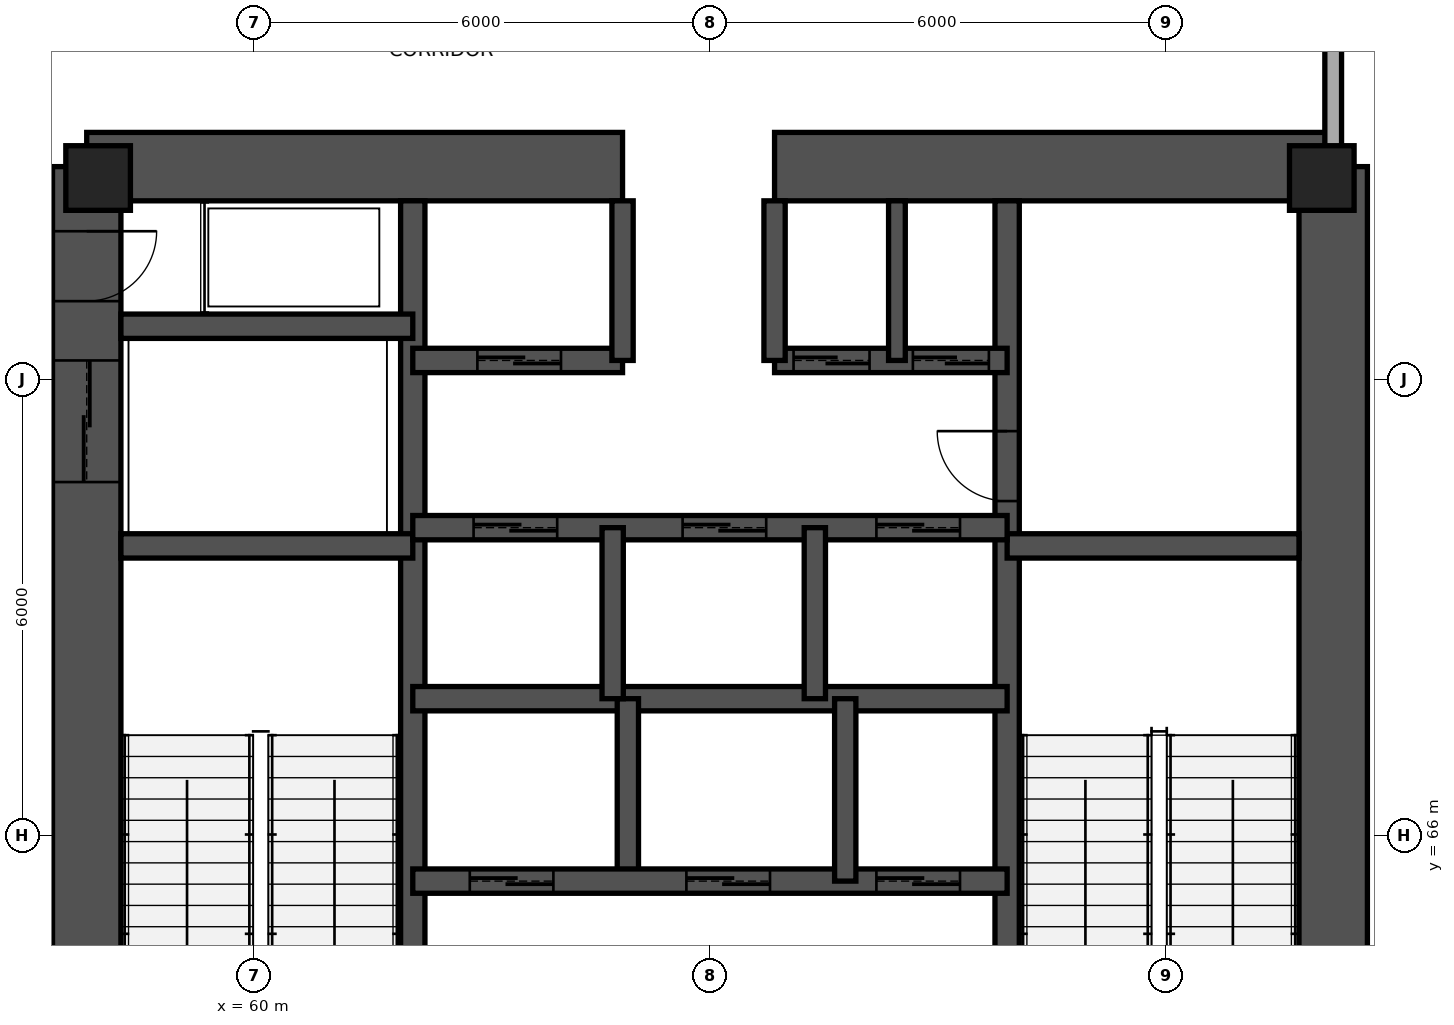
"""IFC4 building model, lengths in metres.
Left out: names, types, materials, properties, quantities, classifications, styles, units other than length and angle.
Written with IfcOpenShell. Run it as: python <this file> out.ifc"""

import sys

from ifc_helpers import new_model, si_unit, direction, frame, frame_2d, origin, origin_2d, place, context, subcontext, project, spatial, rectangle, extrude, element, fill, save


model = new_model("IFC4")
c1 = context("Model", 3, precision=1e-05, world=origin(), true_north=direction((0.0, 1.0)))
c2 = subcontext(c1, "Body", "Model", "MODEL_VIEW")
j1 = project(units=[si_unit("LENGTHUNIT", "METRE"), si_unit("PLANEANGLEUNIT", "RADIAN")], contexts=[c1])
p1 = place(None, origin())
s1 = spatial("IfcSite", under=j1, at=p1, CompositionType="ELEMENT")
p2 = place(p1, origin())
s2 = spatial("IfcBuilding", under=s1, at=p2, CompositionType="ELEMENT")
p3 = place(p2, origin())
s3 = spatial("IfcBuildingStorey", under=s2, at=p3, CompositionType="ELEMENT", Elevation=0.0)
p4 = place(p3, frame((74.2, 61.2, 0.0), z_axis=(0.0, 0.0, 1.0), x_axis=(0.0, 1.0, 0.0)))
e1 = element("IfcWall", 1, at=p4, inside=s3, PredefinedType="SHEAR", context=c2, shape_type="SweptSolid", body=[
    extrude(rectangle(XDim=13.6, YDim=0.9, at=frame_2d((6.8, 0.0))), origin(), (0.0, 0.0, 1.0), 5.4),
])
p5 = place(p3, frame((74.2, 74.8, 0.0), z_axis=(0.0, 0.0, 1.0), x_axis=(-1.0, 0.0, 0.0)))
e2 = element("IfcWall", 2, at=p5, inside=s3, PredefinedType="SHEAR", context=c2, shape_type="SweptSolid", body=[
    extrude(rectangle(XDim=7.35, YDim=0.9, at=frame_2d((3.675, 0.0))), origin(), (0.0, 0.0, 1.0), 5.4),
])
p6 = place(p3, frame((64.85, 74.8, 0.0), z_axis=(0.0, 0.0, 1.0), x_axis=(-1.0, 0.0, 0.0)))
e3 = element("IfcWall", 3, at=p6, inside=s3, PredefinedType="SHEAR", context=c2, shape_type="SweptSolid", body=[
    extrude(rectangle(XDim=7.05, YDim=0.9, at=frame_2d((3.525, 0.0))), origin(), (0.0, 0.0, 1.0), 5.4),
])
p7 = place(p3, frame((57.8, 74.8, 0.0), z_axis=(0.0, 0.0, 1.0), x_axis=(0.0, -1.0, 0.0)))
e4 = element("IfcWall", 4, at=p7, inside=s3, PredefinedType="SHEAR", context=c2, shape_type="SweptSolid", body=[
    extrude(rectangle(XDim=13.6, YDim=0.9, at=frame_2d((6.8, 0.0))), origin(), (0.0, 0.0, 1.0), 5.4),
])
p8 = place(p7, frame((0.85, 0.0, 0.0)))
e5 = element("IfcOpeningElement", 5, at=p8, cuts=e4, PredefinedType="OPENING", context=c2, shape_type="SweptSolid", body=[
    extrude(rectangle(XDim=0.92, YDim=2.05, at=frame_2d((0.46, 1.025))), frame((0.0, 0.46, 0.0), z_axis=(0.0, -1.0, 0.0), x_axis=(1.0, 0.0, 0.0)), (0.0, 0.0, 1.0), 0.92),
])
p9 = place(p7, frame((2.55, 0.0, 0.0)))
e6 = element("IfcOpeningElement", 6, at=p9, cuts=e4, PredefinedType="OPENING", context=c2, shape_type="SweptSolid", body=[
    extrude(rectangle(XDim=1.6, YDim=2.3, at=frame_2d((0.8, 1.15))), frame((0.0, 0.46, 0.0), z_axis=(0.0, -1.0, 0.0), x_axis=(1.0, 0.0, 0.0)), (0.0, 0.0, 1.0), 0.92),
])
p10 = place(p3, frame((62.09, 61.65, 0.0), z_axis=(0.0, 0.0, 1.0), x_axis=(0.0, 1.0, 0.0)))
e7 = element("IfcWall", 7, at=p10, inside=s3, PredefinedType="SHEAR", context=c2, shape_type="SweptSolid", body=[
    extrude(rectangle(XDim=12.7, YDim=0.32, at=frame_2d((6.35, 0.0))), origin(), (0.0, 0.0, 1.0), 5.4),
])
p11 = place(p10, frame((0.55, 0.0, 0.0)))
e8 = element("IfcOpeningElement", 8, at=p11, cuts=e7, PredefinedType="OPENING", context=c2, shape_type="SweptSolid", body=[
    extrude(rectangle(XDim=1.15, YDim=2.15, at=frame_2d((0.575, 1.075))), frame((0.0, 0.17, 0.0), z_axis=(0.0, -1.0, 0.0), x_axis=(1.0, 0.0, 0.0)), (0.0, 0.0, 1.0), 0.34),
])
p12 = place(p3, frame((69.91, 61.65, 0.0), z_axis=(0.0, 0.0, 1.0), x_axis=(0.0, 1.0, 0.0)))
e9 = element("IfcWall", 9, at=p12, inside=s3, PredefinedType="SHEAR", context=c2, shape_type="SweptSolid", body=[
    extrude(rectangle(XDim=12.7, YDim=0.32, at=frame_2d((6.35, 0.0))), origin(), (0.0, 0.0, 1.0), 5.4),
])
p13 = place(p12, frame((8.75, 0.0, 0.0)))
e10 = element("IfcOpeningElement", 10, at=p13, cuts=e9, PredefinedType="OPENING", context=c2, shape_type="SweptSolid", body=[
    extrude(rectangle(XDim=0.92, YDim=2.05, at=frame_2d((0.46, 1.025))), frame((0.0, 0.17, 0.0), z_axis=(0.0, -1.0, 0.0), x_axis=(1.0, 0.0, 0.0)), (0.0, 0.0, 1.0), 0.34),
])
for number, where, z_axis, x_axis in (
    (11, (58.25, 69.81, 0.0), (0.0, 0.0, 1.0), (1.0, 0.0, 0.0)),
    (12, (69.91, 69.81, 0.0), (0.0, 0.0, 1.0), (1.0, 0.0, 0.0)),
    (13, (58.25, 72.7, 0.0), (0.0, 0.0, 1.0), (1.0, 0.0, 0.0)),
):
    element("IfcWall", number, at=place(p3, frame(where, z_axis=z_axis, x_axis=x_axis)), inside=s3, PredefinedType="SHEAR", context=c2, shape_type="SweptSolid", body=[
        extrude(rectangle(XDim=3.84, YDim=0.32, at=frame_2d((1.92, 0.0))), origin(), (0.0, 0.0, 1.0), 5.4),
    ])
p14 = place(p3, frame((62.09, 67.8, 0.0), z_axis=(0.0, 0.0, 1.0), x_axis=(1.0, 0.0, 0.0)))
e14 = element("IfcWall", 14, at=p14, inside=s3, PredefinedType="SHEAR", context=c2, shape_type="SweptSolid", body=[
    extrude(rectangle(XDim=7.82, YDim=0.32, at=frame_2d((3.91, 0.0))), origin(), (0.0, 0.0, 1.0), 5.4),
])
p15 = place(p3, frame((64.92, 65.4, 0.0), z_axis=(0.0, 0.0, 1.0), x_axis=(0.0, 1.0, 0.0)))
e15 = element("IfcWall", 15, at=p15, inside=s3, PredefinedType="SHEAR", context=c2, shape_type="SweptSolid", body=[
    extrude(rectangle(XDim=2.4, YDim=0.28, at=frame_2d((1.2, 0.0))), origin(), (0.0, 0.0, 1.0), 5.4),
])
p16 = place(p3, frame((62.09, 70.05, 0.0), z_axis=(0.0, 0.0, 1.0), x_axis=(1.0, 0.0, 0.0)))
e16 = element("IfcWall", 16, at=p16, inside=s3, PredefinedType="SHEAR", context=c2, shape_type="SweptSolid", body=[
    extrude(rectangle(XDim=7.82, YDim=0.32, at=frame_2d((3.91, 0.0))), origin(), (0.0, 0.0, 1.0), 5.4),
])
p17 = place(p16, frame((0.8, 0.0, 0.0)))
e17 = element("IfcOpeningElement", 17, at=p17, cuts=e16, PredefinedType="OPENING", context=c2, shape_type="SweptSolid", body=[
    extrude(rectangle(XDim=1.1, YDim=2.2, at=frame_2d((0.55, 1.1))), frame((0.0, 0.17, 0.0), z_axis=(0.0, -1.0, 0.0), x_axis=(1.0, 0.0, 0.0)), (0.0, 0.0, 1.0), 0.34),
])
p18 = place(p16, frame((3.55, 0.0, 0.0)))
e18 = element("IfcOpeningElement", 18, at=p18, cuts=e16, PredefinedType="OPENING", context=c2, shape_type="SweptSolid", body=[
    extrude(rectangle(XDim=1.1, YDim=2.2, at=frame_2d((0.55, 1.1))), frame((0.0, 0.17, 0.0), z_axis=(0.0, -1.0, 0.0), x_axis=(1.0, 0.0, 0.0)), (0.0, 0.0, 1.0), 0.34),
])
p19 = place(p16, frame((6.1, 0.0, 0.0)))
e19 = element("IfcOpeningElement", 19, at=p19, cuts=e16, PredefinedType="OPENING", context=c2, shape_type="SweptSolid", body=[
    extrude(rectangle(XDim=1.1, YDim=2.2, at=frame_2d((0.55, 1.1))), frame((0.0, 0.17, 0.0), z_axis=(0.0, -1.0, 0.0), x_axis=(1.0, 0.0, 0.0)), (0.0, 0.0, 1.0), 0.34),
])
p20 = place(p3, frame((62.09, 72.25, 0.0), z_axis=(0.0, 0.0, 1.0), x_axis=(1.0, 0.0, 0.0)))
e20 = element("IfcWall", 20, at=p20, inside=s3, PredefinedType="SHEAR", context=c2, shape_type="SweptSolid", body=[
    extrude(rectangle(XDim=2.76, YDim=0.32, at=frame_2d((1.38, 0.0))), origin(), (0.0, 0.0, 1.0), 5.4),
])
p21 = place(p20, frame((0.85, 0.0, 0.0)))
e21 = element("IfcOpeningElement", 21, at=p21, cuts=e20, PredefinedType="OPENING", context=c2, shape_type="SweptSolid", body=[
    extrude(rectangle(XDim=1.1, YDim=2.2, at=frame_2d((0.55, 1.1))), frame((0.0, 0.17, 0.0), z_axis=(0.0, -1.0, 0.0), x_axis=(1.0, 0.0, 0.0)), (0.0, 0.0, 1.0), 0.34),
])
p22 = place(p3, frame((66.85, 72.25, 0.0), z_axis=(0.0, 0.0, 1.0), x_axis=(1.0, 0.0, 0.0)))
e22 = element("IfcWall", 22, at=p22, inside=s3, PredefinedType="SHEAR", context=c2, shape_type="SweptSolid", body=[
    extrude(rectangle(XDim=3.06, YDim=0.32, at=frame_2d((1.53, 0.0))), origin(), (0.0, 0.0, 1.0), 5.4),
])
p23 = place(p22, frame((0.25, 0.0, 0.0)))
e23 = element("IfcOpeningElement", 23, at=p23, cuts=e22, PredefinedType="OPENING", context=c2, shape_type="SweptSolid", body=[
    extrude(rectangle(XDim=1.0, YDim=2.2, at=frame_2d((0.5, 1.1))), frame((0.0, 0.17, 0.0), z_axis=(0.0, -1.0, 0.0), x_axis=(1.0, 0.0, 0.0)), (0.0, 0.0, 1.0), 0.34),
])
p24 = place(p22, frame((1.82, 0.0, 0.0)))
e24 = element("IfcOpeningElement", 24, at=p24, cuts=e22, PredefinedType="OPENING", context=c2, shape_type="SweptSolid", body=[
    extrude(rectangle(XDim=1.0, YDim=2.2, at=frame_2d((0.5, 1.1))), frame((0.0, 0.17, 0.0), z_axis=(0.0, -1.0, 0.0), x_axis=(1.0, 0.0, 0.0)), (0.0, 0.0, 1.0), 0.34),
])
for number, where, z_axis, x_axis in (
    (25, (64.85, 72.25, 0.0), (0.0, 0.0, 1.0), (0.0, 1.0, 0.0)),
    (26, (66.85, 72.25, 0.0), (0.0, 0.0, 1.0), (0.0, 1.0, 0.0)),
):
    element("IfcWall", number, at=place(p3, frame(where, z_axis=z_axis, x_axis=x_axis)), inside=s3, PredefinedType="SHEAR", context=c2, shape_type="SweptSolid", body=[
        extrude(rectangle(XDim=2.1, YDim=0.28, at=frame_2d((1.05, 0.0))), origin(), (0.0, 0.0, 1.0), 5.4),
    ])
p25 = place(p3, frame((68.46, 72.25, 0.0), z_axis=(0.0, 0.0, 1.0), x_axis=(0.0, 1.0, 0.0)))
e27 = element("IfcWall", 27, at=p25, inside=s3, PredefinedType="SHEAR", context=c2, shape_type="SweptSolid", body=[
    extrude(rectangle(XDim=2.1, YDim=0.22, at=frame_2d((1.05, 0.0))), origin(), (0.0, 0.0, 1.0), 5.4),
])
p26 = place(p3, frame((62.09, 65.4, 0.0), z_axis=(0.0, 0.0, 1.0), x_axis=(1.0, 0.0, 0.0)))
e28 = element("IfcWall", 28, at=p26, inside=s3, PredefinedType="SHEAR", context=c2, shape_type="SweptSolid", body=[
    extrude(rectangle(XDim=7.82, YDim=0.32, at=frame_2d((3.91, 0.0))), origin(), (0.0, 0.0, 1.0), 5.4),
])
p27 = place(p26, frame((6.1, 0.0, 0.0)))
e29 = element("IfcOpeningElement", 29, at=p27, cuts=e28, PredefinedType="OPENING", context=c2, shape_type="SweptSolid", body=[
    extrude(rectangle(XDim=1.1, YDim=2.2, at=frame_2d((0.55, 1.1))), frame((0.0, 0.17, 0.0), z_axis=(0.0, -1.0, 0.0), x_axis=(1.0, 0.0, 0.0)), (0.0, 0.0, 1.0), 0.34),
])
p28 = place(p26, frame((0.75, 0.0, 0.0)))
e30 = element("IfcOpeningElement", 30, at=p28, cuts=e28, PredefinedType="OPENING", context=c2, shape_type="SweptSolid", body=[
    extrude(rectangle(XDim=1.1, YDim=2.2, at=frame_2d((0.55, 1.1))), frame((0.0, 0.17, 0.0), z_axis=(0.0, -1.0, 0.0), x_axis=(1.0, 0.0, 0.0)), (0.0, 0.0, 1.0), 0.34),
])
p29 = place(p26, frame((3.6, 0.0, 0.0)))
e31 = element("IfcOpeningElement", 31, at=p29, cuts=e28, PredefinedType="OPENING", context=c2, shape_type="SweptSolid", body=[
    extrude(rectangle(XDim=1.1, YDim=2.2, at=frame_2d((0.55, 1.1))), frame((0.0, 0.17, 0.0), z_axis=(0.0, -1.0, 0.0), x_axis=(1.0, 0.0, 0.0)), (0.0, 0.0, 1.0), 0.34),
])
p30 = place(p3, frame((67.78, 65.4, 0.0), z_axis=(0.0, 0.0, 1.0), x_axis=(0.0, 1.0, 0.0)))
e32 = element("IfcWall", 32, at=p30, inside=s3, PredefinedType="SHEAR", context=c2, shape_type="SweptSolid", body=[
    extrude(rectangle(XDim=2.4, YDim=0.28, at=frame_2d((1.2, 0.0))), origin(), (0.0, 0.0, 1.0), 5.4),
])
for number, where, z_axis, x_axis in (
    (33, (64.72, 67.8, 0.0), (0.0, 0.0, 1.0), (0.0, 1.0, 0.0)),
    (34, (67.38, 67.8, 0.0), (0.0, 0.0, 1.0), (0.0, 1.0, 0.0)),
):
    element("IfcWall", number, at=place(p3, frame(where, z_axis=z_axis, x_axis=x_axis)), inside=s3, PredefinedType="SHEAR", context=c2, shape_type="SweptSolid", body=[
        extrude(rectangle(XDim=2.25, YDim=0.28, at=frame_2d((1.125, 0.0))), origin(), (0.0, 0.0, 1.0), 5.4),
    ])
for number, where, z_axis, x_axis in (
    (35, (74.05, 74.65, 0.0), (0.0, 0.0, 1.0), (1.0, 0.0, 0.0)),
    (36, (57.95, 74.65, 0.0), (0.0, 0.0, 1.0), (1.0, 0.0, 0.0)),
):
    element("IfcColumn", number, at=place(p3, frame(where, z_axis=z_axis, x_axis=x_axis)), inside=s3, PredefinedType="COLUMN", context=c2, shape_type="SweptSolid", body=[
        extrude(rectangle(XDim=0.85, YDim=0.85, at=origin_2d()), origin(), (0.0, 0.0, 1.0), 5.4),
    ])
p31 = place(p3, frame((74.2, 75.0, 0.0), z_axis=(0.0, 0.0, 1.0), x_axis=(0.0, 1.0, 0.0)))
e37 = element("IfcWall", 37, at=p31, inside=s3, PredefinedType="PARTITIONING", context=c2, shape_type="SweptSolid", body=[
    extrude(rectangle(XDim=8.1, YDim=0.22, at=frame_2d((4.05, 0.0))), origin(), (0.0, 0.0, 1.0), 4.08),
])
p32 = place(p31, frame((3.2, 0.0, 0.0)))
e38 = element("IfcOpeningElement", 38, at=p32, cuts=e37, PredefinedType="OPENING", context=c2, shape_type="SweptSolid", body=[
    extrude(rectangle(XDim=1.7, YDim=2.2, at=frame_2d((0.85, 1.1))), frame((0.0, 0.12, 0.0), z_axis=(0.0, -1.0, 0.0), x_axis=(1.0, 0.0, 0.0)), (0.0, 0.0, 1.0), 0.24),
])
p33 = place(p27, origin())
e39 = element("IfcDoor", 39, at=p33, inside=s3, OperationType="SLIDING_TO_LEFT", PredefinedType="DOOR", context=c2, shape_type="SweptSolid", body=[
    extrude(rectangle(XDim=1.1, YDim=2.2, at=frame_2d((0.55, 1.1))), frame((0.0, 0.025, 0.0), z_axis=(0.0, -1.0, 0.0), x_axis=(1.0, 0.0, 0.0)), (0.0, 0.0, 1.0), 0.05),
])
fill(e29, e39)
p34 = place(p28, origin())
e40 = element("IfcDoor", 40, at=p34, inside=s3, OperationType="SLIDING_TO_LEFT", PredefinedType="DOOR", context=c2, shape_type="SweptSolid", body=[
    extrude(rectangle(XDim=1.1, YDim=2.2, at=frame_2d((0.55, 1.1))), frame((0.0, 0.025, 0.0), z_axis=(0.0, -1.0, 0.0), x_axis=(1.0, 0.0, 0.0)), (0.0, 0.0, 1.0), 0.05),
])
fill(e30, e40)
p35 = place(p29, origin())
e41 = element("IfcDoor", 41, at=p35, inside=s3, OperationType="SLIDING_TO_LEFT", PredefinedType="DOOR", context=c2, shape_type="SweptSolid", body=[
    extrude(rectangle(XDim=1.1, YDim=2.2, at=frame_2d((0.55, 1.1))), frame((0.0, 0.025, 0.0), z_axis=(0.0, -1.0, 0.0), x_axis=(1.0, 0.0, 0.0)), (0.0, 0.0, 1.0), 0.05),
])
fill(e31, e41)
p36 = place(p17, origin())
e42 = element("IfcDoor", 42, at=p36, inside=s3, OperationType="SLIDING_TO_LEFT", PredefinedType="DOOR", context=c2, shape_type="SweptSolid", body=[
    extrude(rectangle(XDim=1.1, YDim=2.2, at=frame_2d((0.55, 1.1))), frame((0.0, 0.025, 0.0), z_axis=(0.0, -1.0, 0.0), x_axis=(1.0, 0.0, 0.0)), (0.0, 0.0, 1.0), 0.05),
])
fill(e17, e42)
p37 = place(p18, origin())
e43 = element("IfcDoor", 43, at=p37, inside=s3, OperationType="SLIDING_TO_LEFT", PredefinedType="DOOR", context=c2, shape_type="SweptSolid", body=[
    extrude(rectangle(XDim=1.1, YDim=2.2, at=frame_2d((0.55, 1.1))), frame((0.0, 0.025, 0.0), z_axis=(0.0, -1.0, 0.0), x_axis=(1.0, 0.0, 0.0)), (0.0, 0.0, 1.0), 0.05),
])
fill(e18, e43)
p38 = place(p19, origin())
e44 = element("IfcDoor", 44, at=p38, inside=s3, OperationType="SLIDING_TO_LEFT", PredefinedType="DOOR", context=c2, shape_type="SweptSolid", body=[
    extrude(rectangle(XDim=1.1, YDim=2.2, at=frame_2d((0.55, 1.1))), frame((0.0, 0.025, 0.0), z_axis=(0.0, -1.0, 0.0), x_axis=(1.0, 0.0, 0.0)), (0.0, 0.0, 1.0), 0.05),
])
fill(e19, e44)
p39 = place(p21, origin())
e45 = element("IfcDoor", 45, at=p39, inside=s3, OperationType="SLIDING_TO_LEFT", PredefinedType="DOOR", context=c2, shape_type="SweptSolid", body=[
    extrude(rectangle(XDim=1.1, YDim=2.2, at=frame_2d((0.55, 1.1))), frame((0.0, 0.025, 0.0), z_axis=(0.0, -1.0, 0.0), x_axis=(1.0, 0.0, 0.0)), (0.0, 0.0, 1.0), 0.05),
])
fill(e21, e45)
p40 = place(p23, origin())
e46 = element("IfcDoor", 46, at=p40, inside=s3, OperationType="SLIDING_TO_LEFT", PredefinedType="DOOR", context=c2, shape_type="SweptSolid", body=[
    extrude(rectangle(XDim=1.0, YDim=2.2, at=frame_2d((0.5, 1.1))), frame((0.0, 0.025, 0.0), z_axis=(0.0, -1.0, 0.0), x_axis=(1.0, 0.0, 0.0)), (0.0, 0.0, 1.0), 0.05),
])
fill(e23, e46)
p41 = place(p24, origin())
e47 = element("IfcDoor", 47, at=p41, inside=s3, OperationType="SLIDING_TO_LEFT", PredefinedType="DOOR", context=c2, shape_type="SweptSolid", body=[
    extrude(rectangle(XDim=1.0, YDim=2.2, at=frame_2d((0.5, 1.1))), frame((0.0, 0.025, 0.0), z_axis=(0.0, -1.0, 0.0), x_axis=(1.0, 0.0, 0.0)), (0.0, 0.0, 1.0), 0.05),
])
fill(e24, e47)
p42 = place(p8, origin())
e48 = element("IfcDoor", 48, at=p42, inside=s3, OperationType="SINGLE_SWING_LEFT", PredefinedType="DOOR", context=c2, shape_type="SweptSolid", body=[
    extrude(rectangle(XDim=0.92, YDim=2.05, at=frame_2d((0.46, 1.025))), frame((0.0, 0.025, 0.0), z_axis=(0.0, -1.0, 0.0), x_axis=(1.0, 0.0, 0.0)), (0.0, 0.0, 1.0), 0.05),
])
fill(e5, e48)
p43 = place(p9, origin())
e49 = element("IfcDoor", 49, at=p43, inside=s3, OperationType="DOUBLE_DOOR_SLIDING", PredefinedType="DOOR", context=c2, shape_type="SweptSolid", body=[
    extrude(rectangle(XDim=1.6, YDim=2.3, at=frame_2d((0.8, 1.15))), frame((0.0, 0.025, 0.0), z_axis=(0.0, -1.0, 0.0), x_axis=(1.0, 0.0, 0.0)), (0.0, 0.0, 1.0), 0.05),
])
fill(e6, e49)
p44 = place(p13, origin())
e50 = element("IfcDoor", 50, at=p44, inside=s3, OperationType="SINGLE_SWING_RIGHT", PredefinedType="DOOR", context=c2, shape_type="SweptSolid", body=[
    extrude(rectangle(XDim=0.92, YDim=2.05, at=frame_2d((0.46, 1.025))), frame((0.0, 0.025, 0.0), z_axis=(0.0, -1.0, 0.0), x_axis=(1.0, 0.0, 0.0)), (0.0, 0.0, 1.0), 0.05),
])
fill(e10, e50)
save(model, sys.argv[1])
